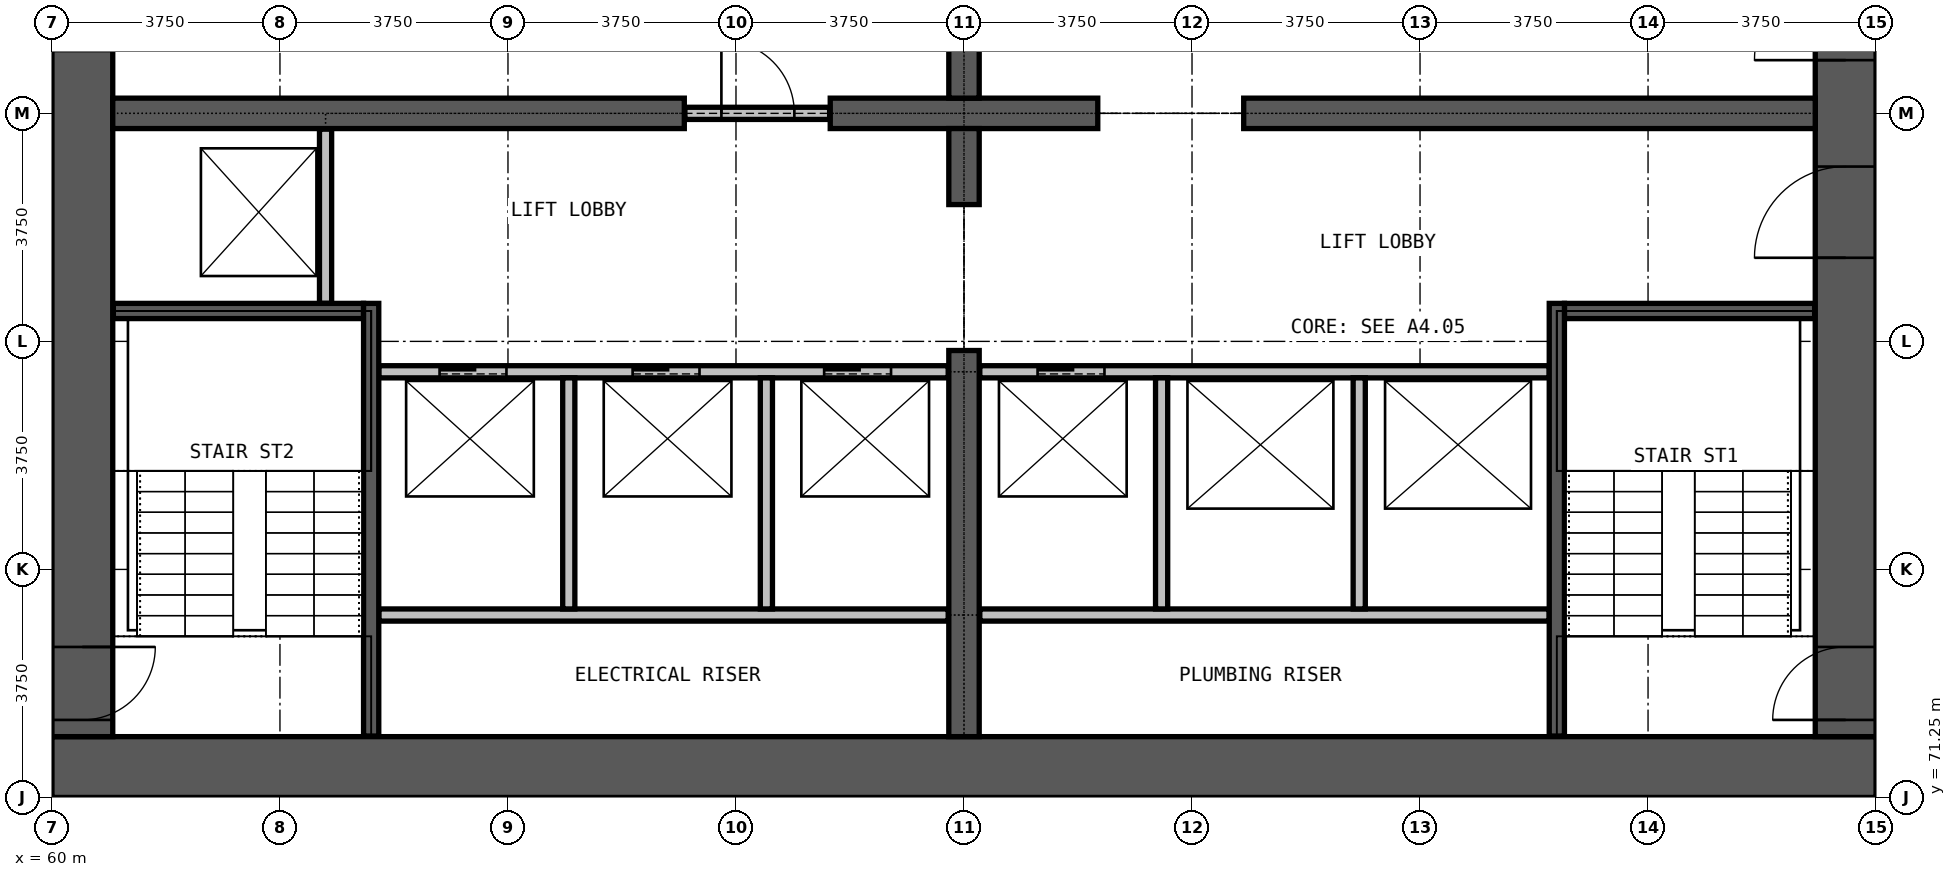
"""IFC4 building model, lengths in metres.
Left out: names, types, materials, properties, quantities, classifications, styles, units other than length and angle.
Written with IfcOpenShell. Run it as: python <this file> out.ifc"""

import sys

from ifc_helpers import new_model, si_unit, direction, frame, frame_2d, origin, place, context, subcontext, project, spatial, rectangle, extrude, element, fill, save


model = new_model("IFC4")
c1 = context("Model", 3, precision=1e-05, world=origin(), true_north=direction((0.0, 1.0)))
c2 = subcontext(c1, "Body", "Model", "MODEL_VIEW")
j1 = project(units=[si_unit("LENGTHUNIT", "METRE"), si_unit("PLANEANGLEUNIT", "RADIAN")], contexts=[c1])
p1 = place(None, origin())
s1 = spatial("IfcSite", under=j1, at=p1, CompositionType="ELEMENT")
p2 = place(p1, origin())
s2 = spatial("IfcBuilding", under=s1, at=p2, CompositionType="ELEMENT")
p3 = place(p2, frame((0.0, 0.0, 24.0)))
s3 = spatial("IfcBuildingStorey", under=s2, at=p3, CompositionType="ELEMENT", Elevation=24.0)
p4 = place(p3, frame((60.0, 71.75, 0.0), z_axis=(0.0, 0.0, 1.0), x_axis=(1.0, 0.0, 0.0)))
e1 = element("IfcWall", 1, at=p4, inside=s3, PredefinedType="SHEAR", context=c2, shape_type="SweptSolid", body=[
    extrude(rectangle(XDim=30.0, YDim=1.0, at=frame_2d((15.0, 0.0))), origin(), (0.0, 0.0, 1.0), 6.0),
])
p5 = place(p3, frame((89.5, 72.25, 0.0), z_axis=(0.0, 0.0, 1.0), x_axis=(0.0, 1.0, 0.0)))
e2 = element("IfcWall", 2, at=p5, inside=s3, PredefinedType="SHEAR", context=c2, shape_type="SweptSolid", body=[
    extrude(rectangle(XDim=20.5, YDim=1.0, at=frame_2d((10.25, 0.0))), origin(), (0.0, 0.0, 1.0), 6.0),
])
p6 = place(p5, frame((0.275, 0.0, 0.0)))
e3 = element("IfcOpeningElement", 3, at=p6, cuts=e2, PredefinedType="OPENING", context=c2, shape_type="SweptSolid", body=[
    extrude(rectangle(XDim=1.2, YDim=2.2, at=frame_2d((0.6, 1.1))), frame((0.0, 0.51, 0.0), z_axis=(0.0, -1.0, 0.0), x_axis=(1.0, 0.0, 0.0)), (0.0, 0.0, 1.0), 1.02),
])
p7 = place(p5, frame((13.775, 0.0, 0.0)))
e4 = element("IfcOpeningElement", 4, at=p7, cuts=e2, PredefinedType="OPENING", context=c2, shape_type="SweptSolid", body=[
    extrude(rectangle(XDim=1.2, YDim=2.2, at=frame_2d((0.6, 1.1))), frame((0.0, 0.51, 0.0), z_axis=(0.0, -1.0, 0.0), x_axis=(1.0, 0.0, 0.0)), (0.0, 0.0, 1.0), 1.02),
])
p8 = place(p5, frame((7.875, 0.0, 0.0)))
e5 = element("IfcOpeningElement", 5, at=p8, cuts=e2, PredefinedType="OPENING", context=c2, shape_type="SweptSolid", body=[
    extrude(rectangle(XDim=1.5, YDim=2.2, at=frame_2d((0.75, 1.1))), frame((0.0, 0.51, 0.0), z_axis=(0.0, -1.0, 0.0), x_axis=(1.0, 0.0, 0.0)), (0.0, 0.0, 1.0), 1.02),
])
p9 = place(p5, frame((11.125, 0.0, 0.0)))
e6 = element("IfcOpeningElement", 6, at=p9, cuts=e2, PredefinedType="OPENING", context=c2, shape_type="SweptSolid", body=[
    extrude(rectangle(XDim=1.5, YDim=2.2, at=frame_2d((0.75, 1.1))), frame((0.0, 0.51, 0.0), z_axis=(0.0, -1.0, 0.0), x_axis=(1.0, 0.0, 0.0)), (0.0, 0.0, 1.0), 1.02),
])
p10 = place(p3, frame((60.5, 92.75, 0.0), z_axis=(0.0, 0.0, 1.0), x_axis=(0.0, -1.0, 0.0)))
e7 = element("IfcWall", 7, at=p10, inside=s3, PredefinedType="SHEAR", context=c2, shape_type="SweptSolid", body=[
    extrude(rectangle(XDim=20.5, YDim=1.0, at=frame_2d((10.25, 0.0))), origin(), (0.0, 0.0, 1.0), 6.0),
])
p11 = place(p10, frame((19.025, 0.0, 0.0)))
e8 = element("IfcOpeningElement", 8, at=p11, cuts=e7, PredefinedType="OPENING", context=c2, shape_type="SweptSolid", body=[
    extrude(rectangle(XDim=1.2, YDim=2.2, at=frame_2d((0.6, 1.1))), frame((0.0, 0.51, 0.0), z_axis=(0.0, -1.0, 0.0), x_axis=(1.0, 0.0, 0.0)), (0.0, 0.0, 1.0), 1.02),
])
p12 = place(p10, frame((8.025, 0.0, 0.0)))
e9 = element("IfcOpeningElement", 9, at=p12, cuts=e7, PredefinedType="OPENING", context=c2, shape_type="SweptSolid", body=[
    extrude(rectangle(XDim=1.2, YDim=2.2, at=frame_2d((0.6, 1.1))), frame((0.0, 0.51, 0.0), z_axis=(0.0, -1.0, 0.0), x_axis=(1.0, 0.0, 0.0)), (0.0, 0.0, 1.0), 1.02),
])
p13 = place(p3, frame((61.0, 82.5, 0.0), z_axis=(0.0, 0.0, 1.0), x_axis=(1.0, 0.0, 0.0)))
e10 = element("IfcWall", 10, at=p13, inside=s3, PredefinedType="SHEAR", context=c2, shape_type="SweptSolid", body=[
    extrude(rectangle(XDim=9.4, YDim=0.5, at=frame_2d((4.7, 0.0))), origin(), (0.0, 0.0, 1.0), 6.0),
])
p14 = place(p3, frame((72.8, 82.5, 0.0), z_axis=(0.0, 0.0, 1.0), x_axis=(1.0, 0.0, 0.0)))
e11 = element("IfcWall", 11, at=p14, inside=s3, PredefinedType="SHEAR", context=c2, shape_type="SweptSolid", body=[
    extrude(rectangle(XDim=4.4, YDim=0.5, at=frame_2d((2.2, 0.0))), origin(), (0.0, 0.0, 1.0), 6.0),
])
p15 = place(p3, frame((79.6, 82.5, 0.0), z_axis=(0.0, 0.0, 1.0), x_axis=(1.0, 0.0, 0.0)))
e12 = element("IfcWall", 12, at=p15, inside=s3, PredefinedType="SHEAR", context=c2, shape_type="SweptSolid", body=[
    extrude(rectangle(XDim=9.4, YDim=0.5, at=frame_2d((4.7, 0.0))), origin(), (0.0, 0.0, 1.0), 6.0),
])
p16 = place(p3, frame((75.0, 72.25, 0.0), z_axis=(0.0, 0.0, 1.0), x_axis=(0.0, 1.0, 0.0)))
e13 = element("IfcWall", 13, at=p16, inside=s3, PredefinedType="SHEAR", context=c2, shape_type="SweptSolid", body=[
    extrude(rectangle(XDim=6.35, YDim=0.5, at=frame_2d((3.175, 0.0))), origin(), (0.0, 0.0, 1.0), 6.0),
])
for number, where, z_axis, x_axis in (
    (14, (75.0, 81.0, 0.0), (0.0, 0.0, 1.0), (0.0, 1.0, 0.0)),
    (15, (75.0, 82.75, 0.0), (0.0, 0.0, 1.0), (0.0, 1.0, 0.0)),
):
    element("IfcWall", number, at=place(p3, frame(where, z_axis=z_axis, x_axis=x_axis)), inside=s3, PredefinedType="SHEAR", context=c2, shape_type="SweptSolid", body=[
        extrude(rectangle(XDim=1.25, YDim=0.5, at=frame_2d((0.625, 0.0))), origin(), (0.0, 0.0, 1.0), 6.0),
    ])
p17 = place(p3, frame((70.41, 82.5, 0.0), z_axis=(0.0, 0.0, 1.0), x_axis=(1.0, 0.0, 0.0)))
e16 = element("IfcWall", 16, at=p17, inside=s3, PredefinedType="PARTITIONING", context=c2, shape_type="SweptSolid", body=[
    extrude(rectangle(XDim=2.38, YDim=0.2, at=frame_2d((1.19, 0.0))), origin(), (0.0, 0.0, 1.0), 2.4),
])
p18 = place(p17, frame((0.6, 0.0, 0.0)))
e17 = element("IfcOpeningElement", 17, at=p18, cuts=e16, PredefinedType="OPENING", context=c2, shape_type="SweptSolid", body=[
    extrude(rectangle(XDim=1.2, YDim=2.2, at=frame_2d((0.6, 1.1))), frame((0.0, 0.11, 0.0), z_axis=(0.0, -1.0, 0.0), x_axis=(1.0, 0.0, 0.0)), (0.0, 0.0, 1.0), 0.22),
])
for number, where, z_axis, x_axis in (
    (18, (65.375, 74.25, 0.0), (0.0, 0.0, 1.0), (1.0, 0.0, 0.0)),
    (19, (75.26, 74.25, 0.0), (0.0, 0.0, 1.0), (1.0, 0.0, 0.0)),
):
    element("IfcWall", number, at=place(p3, frame(where, z_axis=z_axis, x_axis=x_axis)), inside=s3, PredefinedType="PARTITIONING", context=c2, shape_type="SweptSolid", body=[
        extrude(rectangle(XDim=9.365, YDim=0.2, at=frame_2d((4.683, 0.0))), origin(), (0.0, 0.0, 1.0), 5.65),
    ])
p19 = place(p3, frame((65.375, 78.25, 0.0), z_axis=(0.0, 0.0, 1.0), x_axis=(1.0, 0.0, 0.0)))
e20 = element("IfcWall", 20, at=p19, inside=s3, PredefinedType="PARTITIONING", context=c2, shape_type="SweptSolid", body=[
    extrude(rectangle(XDim=9.365, YDim=0.2, at=frame_2d((4.683, 0.0))), origin(), (0.0, 0.0, 1.0), 5.65),
])
p20 = place(p19, frame((1.0, 0.0, 0.0)))
e21 = element("IfcOpeningElement", 21, at=p20, cuts=e20, PredefinedType="OPENING", context=c2, shape_type="SweptSolid", body=[
    extrude(rectangle(XDim=1.1, YDim=2.2, at=frame_2d((0.55, 1.1))), frame((0.0, 0.11, 0.0), z_axis=(0.0, -1.0, 0.0), x_axis=(1.0, 0.0, 0.0)), (0.0, 0.0, 1.0), 0.22),
])
p21 = place(p19, frame((4.175, 0.0, 0.0)))
e22 = element("IfcOpeningElement", 22, at=p21, cuts=e20, PredefinedType="OPENING", context=c2, shape_type="SweptSolid", body=[
    extrude(rectangle(XDim=1.1, YDim=2.2, at=frame_2d((0.55, 1.1))), frame((0.0, 0.11, 0.0), z_axis=(0.0, -1.0, 0.0), x_axis=(1.0, 0.0, 0.0)), (0.0, 0.0, 1.0), 0.22),
])
p22 = place(p19, frame((7.325, 0.0, 0.0)))
e23 = element("IfcOpeningElement", 23, at=p22, cuts=e20, PredefinedType="OPENING", context=c2, shape_type="SweptSolid", body=[
    extrude(rectangle(XDim=1.1, YDim=2.2, at=frame_2d((0.55, 1.1))), frame((0.0, 0.11, 0.0), z_axis=(0.0, -1.0, 0.0), x_axis=(1.0, 0.0, 0.0)), (0.0, 0.0, 1.0), 0.22),
])
p23 = place(p3, frame((75.26, 78.25, 0.0), z_axis=(0.0, 0.0, 1.0), x_axis=(1.0, 0.0, 0.0)))
e24 = element("IfcWall", 24, at=p23, inside=s3, PredefinedType="PARTITIONING", context=c2, shape_type="SweptSolid", body=[
    extrude(rectangle(XDim=9.365, YDim=0.2, at=frame_2d((4.683, 0.0))), origin(), (0.0, 0.0, 1.0), 5.65),
])
p24 = place(p23, frame((0.95, 0.0, 0.0)))
e25 = element("IfcOpeningElement", 25, at=p24, cuts=e24, PredefinedType="OPENING", context=c2, shape_type="SweptSolid", body=[
    extrude(rectangle(XDim=1.1, YDim=2.2, at=frame_2d((0.55, 1.1))), frame((0.0, 0.11, 0.0), z_axis=(0.0, -1.0, 0.0), x_axis=(1.0, 0.0, 0.0)), (0.0, 0.0, 1.0), 0.22),
])
p25 = place(p3, frame((64.5, 79.375, 0.0), z_axis=(0.0, 0.0, 1.0), x_axis=(0.0, 1.0, 0.0)))
e26 = element("IfcWall", 26, at=p25, inside=s3, PredefinedType="PARTITIONING", context=c2, shape_type="SweptSolid", body=[
    extrude(rectangle(XDim=2.865, YDim=0.2, at=frame_2d((1.433, 0.0))), origin(), (0.0, 0.0, 1.0), 5.65),
])
for number, where, z_axis, x_axis in (
    (27, (68.5, 74.35, 0.0), (0.0, 0.0, 1.0), (0.0, 1.0, 0.0)),
    (28, (71.75, 74.35, 0.0), (0.0, 0.0, 1.0), (0.0, 1.0, 0.0)),
    (29, (78.25, 74.35, 0.0), (0.0, 0.0, 1.0), (0.0, 1.0, 0.0)),
    (30, (81.5, 74.35, 0.0), (0.0, 0.0, 1.0), (0.0, 1.0, 0.0)),
):
    element("IfcWall", number, at=place(p3, frame(where, z_axis=z_axis, x_axis=x_axis)), inside=s3, PredefinedType="PARTITIONING", context=c2, shape_type="SweptSolid", body=[
        extrude(rectangle(XDim=3.8, YDim=0.2, at=frame_2d((1.9, 0.0))), origin(), (0.0, 0.0, 1.0), 5.65),
    ])
for number, where, z_axis, x_axis in (
    (31, (61.01, 79.25, 0.0), (0.0, 0.0, 1.0), (1.0, 0.0, 0.0)),
    (32, (84.875, 79.25, 0.0), (0.0, 0.0, 1.0), (1.0, 0.0, 0.0)),
):
    element("IfcWall", number, at=place(p3, frame(where, z_axis=z_axis, x_axis=x_axis)), inside=s3, PredefinedType="PARTITIONING", context=c2, shape_type="SweptSolid", body=[
        extrude(rectangle(XDim=4.115, YDim=0.25, at=frame_2d((2.058, 0.0))), origin(), (0.0, 0.0, 1.0), 5.65),
    ])
for number, where, z_axis, x_axis in (
    (33, (65.25, 72.26, 0.0), (0.0, 0.0, 1.0), (0.0, 1.0, 0.0)),
    (34, (84.75, 72.26, 0.0), (0.0, 0.0, 1.0), (0.0, 1.0, 0.0)),
):
    element("IfcWall", number, at=place(p3, frame(where, z_axis=z_axis, x_axis=x_axis)), inside=s3, PredefinedType="PARTITIONING", context=c2, shape_type="SweptSolid", body=[
        extrude(rectangle(XDim=7.115, YDim=0.25, at=frame_2d((3.558, 0.0))), origin(), (0.0, 0.0, 1.0), 5.65),
    ])
p26 = place(p20, origin())
e35 = element("IfcDoor", 35, at=p26, inside=s3, OperationType="DOUBLE_DOOR_SLIDING", PredefinedType="DOOR", context=c2, shape_type="SweptSolid", body=[
    extrude(rectangle(XDim=1.1, YDim=2.2, at=frame_2d((0.55, 1.1))), frame((0.0, 0.025, 0.0), z_axis=(0.0, -1.0, 0.0), x_axis=(1.0, 0.0, 0.0)), (0.0, 0.0, 1.0), 0.05),
])
fill(e21, e35)
p27 = place(p21, origin())
e36 = element("IfcDoor", 36, at=p27, inside=s3, OperationType="DOUBLE_DOOR_SLIDING", PredefinedType="DOOR", context=c2, shape_type="SweptSolid", body=[
    extrude(rectangle(XDim=1.1, YDim=2.2, at=frame_2d((0.55, 1.1))), frame((0.0, 0.025, 0.0), z_axis=(0.0, -1.0, 0.0), x_axis=(1.0, 0.0, 0.0)), (0.0, 0.0, 1.0), 0.05),
])
fill(e22, e36)
p28 = place(p22, origin())
e37 = element("IfcDoor", 37, at=p28, inside=s3, OperationType="DOUBLE_DOOR_SLIDING", PredefinedType="DOOR", context=c2, shape_type="SweptSolid", body=[
    extrude(rectangle(XDim=1.1, YDim=2.2, at=frame_2d((0.55, 1.1))), frame((0.0, 0.025, 0.0), z_axis=(0.0, -1.0, 0.0), x_axis=(1.0, 0.0, 0.0)), (0.0, 0.0, 1.0), 0.05),
])
fill(e23, e37)
p29 = place(p24, origin())
e38 = element("IfcDoor", 38, at=p29, inside=s3, OperationType="DOUBLE_DOOR_SLIDING", PredefinedType="DOOR", context=c2, shape_type="SweptSolid", body=[
    extrude(rectangle(XDim=1.1, YDim=2.2, at=frame_2d((0.55, 1.1))), frame((0.0, 0.025, 0.0), z_axis=(0.0, -1.0, 0.0), x_axis=(1.0, 0.0, 0.0)), (0.0, 0.0, 1.0), 0.05),
])
fill(e25, e38)
p30 = place(p18, origin())
e39 = element("IfcDoor", 39, at=p30, inside=s3, OperationType="SINGLE_SWING_LEFT", PredefinedType="DOOR", context=c2, shape_type="SweptSolid", body=[
    extrude(rectangle(XDim=1.2, YDim=2.2, at=frame_2d((0.6, 1.1))), frame((0.0, 0.025, 0.0), z_axis=(0.0, -1.0, 0.0), x_axis=(1.0, 0.0, 0.0)), (0.0, 0.0, 1.0), 0.05),
])
fill(e17, e39)
p31 = place(p6, origin())
e40 = element("IfcDoor", 40, at=p31, inside=s3, OperationType="SINGLE_SWING_RIGHT", PredefinedType="DOOR", context=c2, shape_type="SweptSolid", body=[
    extrude(rectangle(XDim=1.2, YDim=2.2, at=frame_2d((0.6, 1.1))), frame((0.0, 0.025, 0.0), z_axis=(0.0, -1.0, 0.0), x_axis=(1.0, 0.0, 0.0)), (0.0, 0.0, 1.0), 0.05),
])
fill(e3, e40)
p32 = place(p11, origin())
e41 = element("IfcDoor", 41, at=p32, inside=s3, OperationType="SINGLE_SWING_RIGHT", PredefinedType="DOOR", context=c2, shape_type="SweptSolid", body=[
    extrude(rectangle(XDim=1.2, YDim=2.2, at=frame_2d((0.6, 1.1))), frame((0.0, 0.025, 0.0), z_axis=(0.0, -1.0, 0.0), x_axis=(1.0, 0.0, 0.0)), (0.0, 0.0, 1.0), 0.05),
])
fill(e8, e41)
p33 = place(p8, origin())
e42 = element("IfcDoor", 42, at=p33, inside=s3, OperationType="DOUBLE_DOOR_SINGLE_SWING", PredefinedType="DOOR", context=c2, shape_type="SweptSolid", body=[
    extrude(rectangle(XDim=1.5, YDim=2.2, at=frame_2d((0.75, 1.1))), frame((0.0, 0.025, 0.0), z_axis=(0.0, -1.0, 0.0), x_axis=(1.0, 0.0, 0.0)), (0.0, 0.0, 1.0), 0.05),
])
fill(e5, e42)
p34 = place(p9, origin())
e43 = element("IfcDoor", 43, at=p34, inside=s3, OperationType="DOUBLE_DOOR_SINGLE_SWING", PredefinedType="DOOR", context=c2, shape_type="SweptSolid", body=[
    extrude(rectangle(XDim=1.5, YDim=2.2, at=frame_2d((0.75, 1.1))), frame((0.0, 0.025, 0.0), z_axis=(0.0, -1.0, 0.0), x_axis=(1.0, 0.0, 0.0)), (0.0, 0.0, 1.0), 0.05),
])
fill(e6, e43)
save(model, sys.argv[1])
